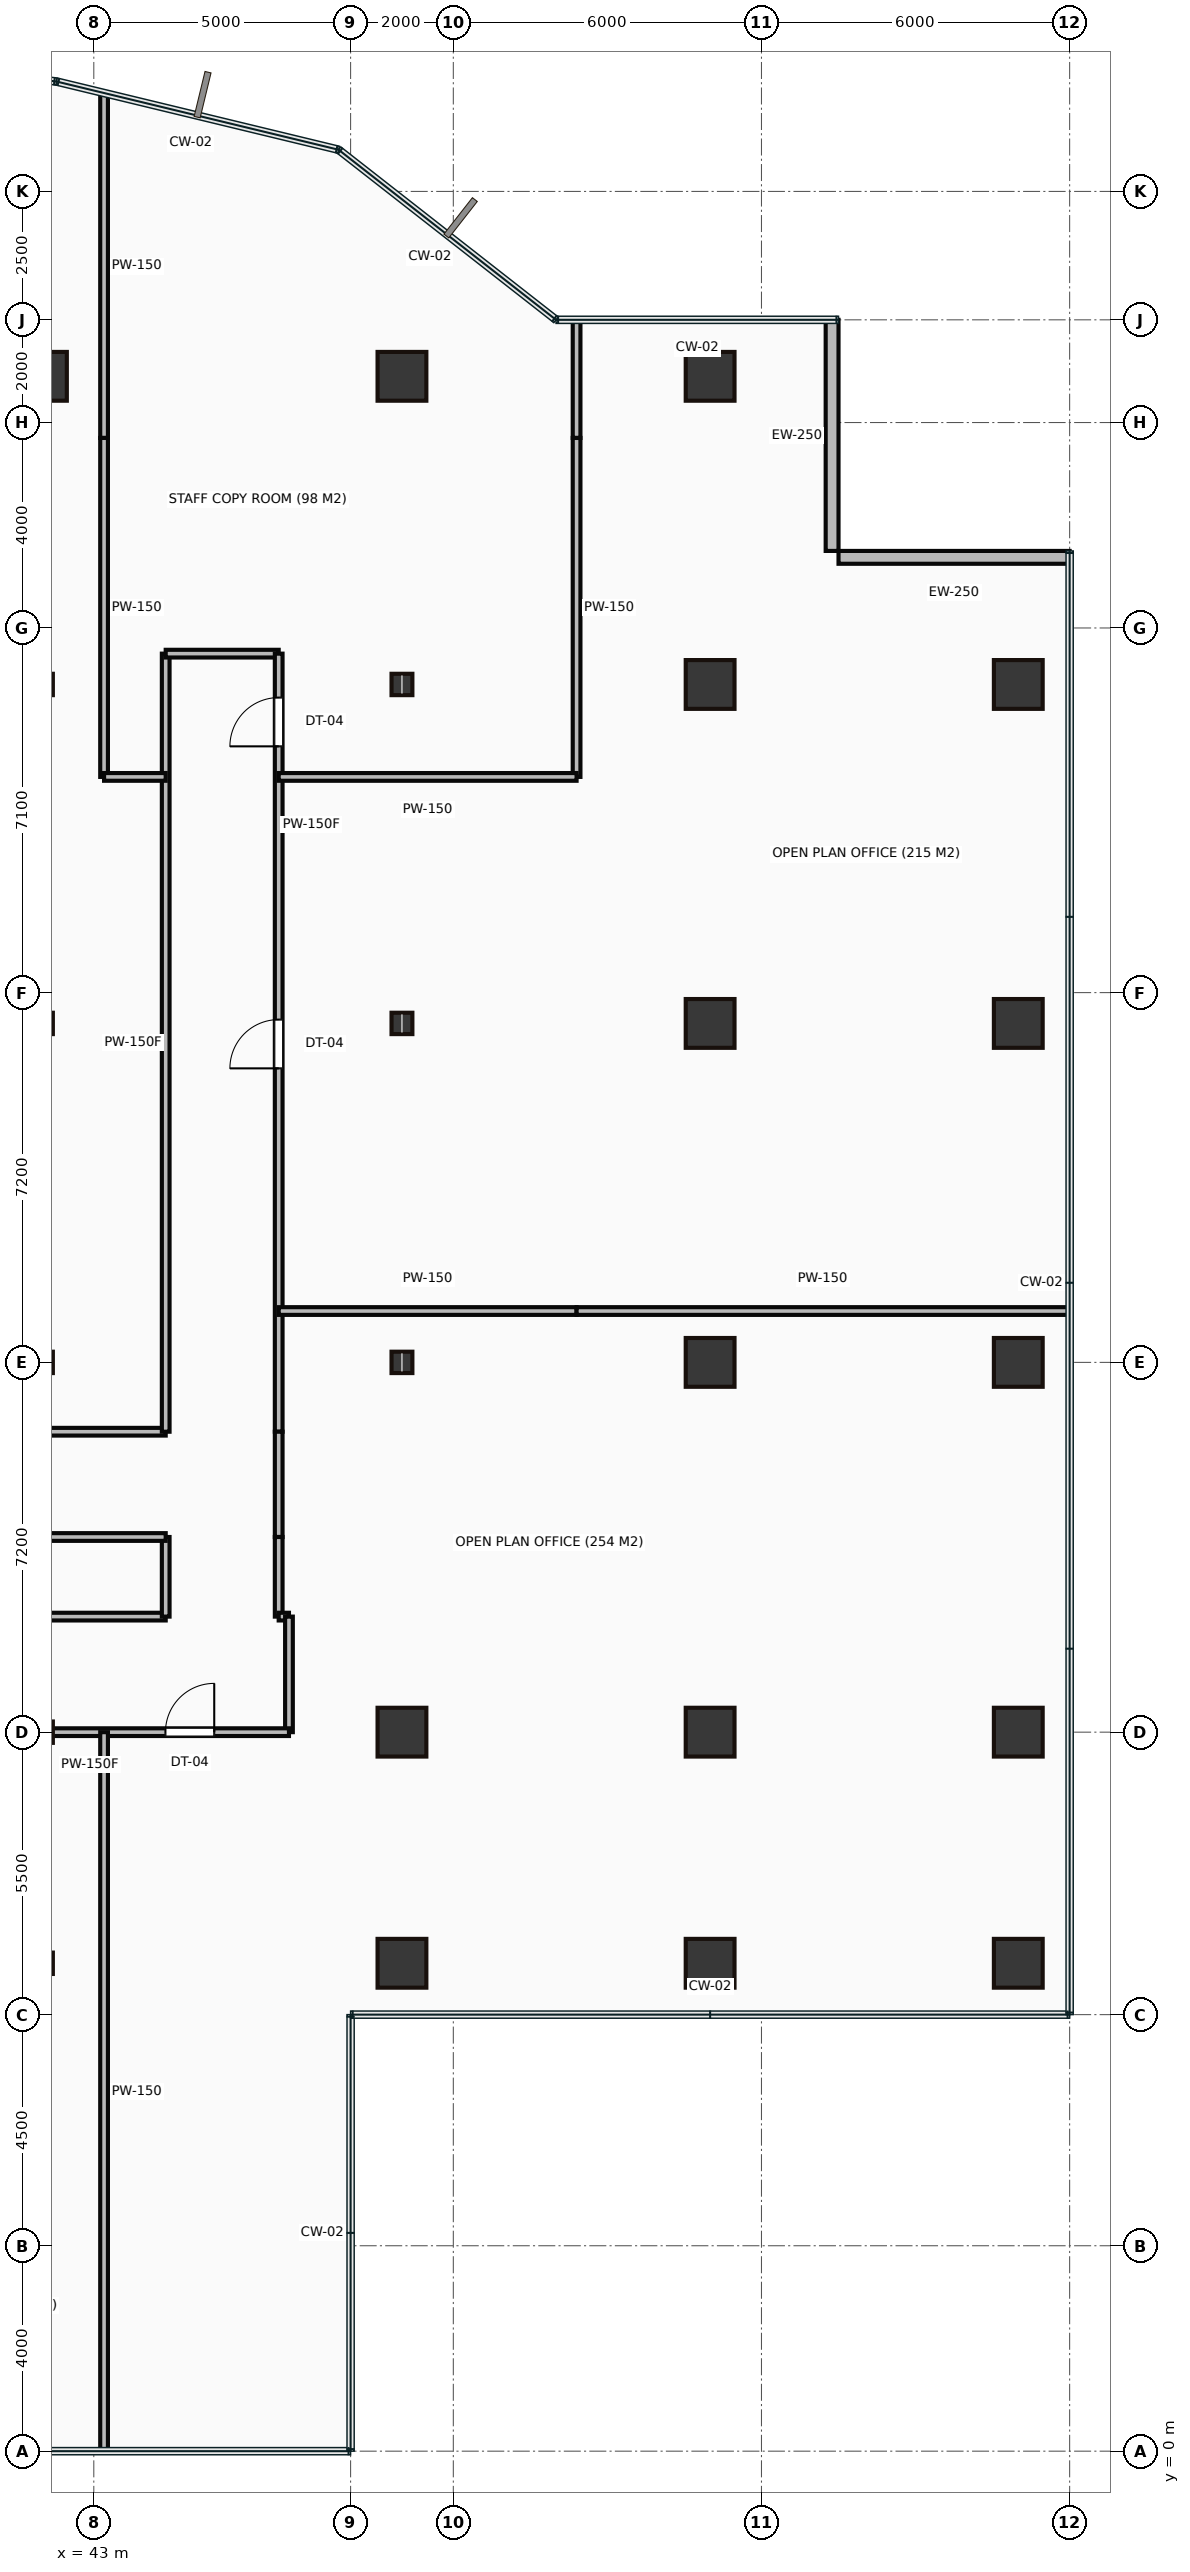
"""IFC4 building model, lengths in metres.
Left out: names, types, materials, properties, quantities, classifications, styles, units other than length and angle.
Written with IfcOpenShell. Run it as: python <this file> out.ifc"""

import sys

from ifc_helpers import new_model, si_unit, direction, frame, frame_2d, origin, origin_2d, place, context, subcontext, project, spatial, rectangle, hollow_rectangle, i_section, extrude, source, transform, mapped, element, fill, save


model = new_model("IFC4")
c1 = context("Model", 3, precision=1e-05, world=origin(), true_north=direction((0.0, 1.0)))
c2 = subcontext(c1, "Body", "Model", "MODEL_VIEW")
j1 = project(units=[si_unit("LENGTHUNIT", "METRE"), si_unit("PLANEANGLEUNIT", "RADIAN")], contexts=[c1])
p1 = place(None, origin())
s1 = spatial("IfcSite", under=j1, at=p1, CompositionType="ELEMENT")
p2 = place(p1, origin())
s2 = spatial("IfcBuilding", under=s1, at=p2, CompositionType="ELEMENT")
p3 = place(p2, frame((0.0, 0.0, 76.3)))
s3 = spatial("IfcBuildingStorey", under=s2, at=p3, CompositionType="ELEMENT", Elevation=76.3)
m1 = source(origin(), c2, "Body", "SweptSolid", [
    extrude(i_section(OverallWidth=0.406, OverallDepth=0.416, WebThickness=0.03, FlangeThickness=0.048, at=origin_2d()), origin(), (0.0, 0.0, 1.0), 3.65),
])
for number, where, z_axis, x_axis in (
    (1, (42.0, 9.5, 0.0), (0.0, 0.0, 1.0), (1.0, 0.0, 0.0)),
    (2, (42.0, 14.0, 0.0), (0.0, 0.0, 1.0), (1.0, 0.0, 0.0)),
    (3, (42.0, 21.2, 0.0), (0.0, 0.0, 1.0), (1.0, 0.0, 0.0)),
    (4, (42.0, 27.8, 0.0), (0.0, 0.0, 1.0), (1.0, 0.0, 0.0)),
    (5, (42.0, 34.4, 0.0), (0.0, 0.0, 1.0), (1.0, 0.0, 0.0)),
):
    element("IfcColumn", number, at=place(p3, frame(where, z_axis=z_axis, x_axis=x_axis)), inside=s3, PredefinedType="COLUMN", context=c2, shape_type="MappedRepresentation", body=[
        mapped(m1, transform((0.0, 0.0, 0.0))),
    ])
m2 = source(origin(), c2, "Body", "SweptSolid", [
    extrude(hollow_rectangle(XDim=0.95, YDim=0.95, WallThickness=0.045, at=origin_2d()), origin(), (0.0, 0.0, 1.0), 3.65),
])
for number, where, z_axis, x_axis in (
    (6, (42.0, 40.4, 0.0), (0.0, 0.0, 1.0), (1.0, 0.0, 0.0)),
    (7, (49.0, 9.5, 0.0), (0.0, 0.0, 1.0), (1.0, 0.0, 0.0)),
    (8, (49.0, 14.0, 0.0), (0.0, 0.0, 1.0), (1.0, 0.0, 0.0)),
):
    element("IfcColumn", number, at=place(p3, frame(where, z_axis=z_axis, x_axis=x_axis)), inside=s3, PredefinedType="COLUMN", context=c2, shape_type="MappedRepresentation", body=[
        mapped(m2, transform((0.0, 0.0, 0.0))),
    ])
for number, where, z_axis, x_axis in (
    (9, (49.0, 21.2, 0.0), (0.0, 0.0, 1.0), (1.0, 0.0, 0.0)),
    (10, (49.0, 27.8, 0.0), (0.0, 0.0, 1.0), (1.0, 0.0, 0.0)),
    (11, (49.0, 34.4, 0.0), (0.0, 0.0, 1.0), (1.0, 0.0, 0.0)),
):
    element("IfcColumn", number, at=place(p3, frame(where, z_axis=z_axis, x_axis=x_axis)), inside=s3, PredefinedType="COLUMN", context=c2, shape_type="MappedRepresentation", body=[
        mapped(m1, transform((0.0, 0.0, 0.0))),
    ])
for number, where, z_axis, x_axis in (
    (12, (49.0, 40.4, 0.0), (0.0, 0.0, 1.0), (1.0, 0.0, 0.0)),
    (13, (55.0, 9.5, 0.0), (0.0, 0.0, 1.0), (1.0, 0.0, 0.0)),
    (14, (55.0, 14.0, 0.0), (0.0, 0.0, 1.0), (1.0, 0.0, 0.0)),
    (15, (55.0, 21.2, 0.0), (0.0, 0.0, 1.0), (1.0, 0.0, 0.0)),
    (16, (55.0, 27.8, 0.0), (0.0, 0.0, 1.0), (1.0, 0.0, 0.0)),
    (17, (55.0, 34.4, 0.0), (0.0, 0.0, 1.0), (1.0, 0.0, 0.0)),
    (18, (55.0, 40.4, 0.0), (0.0, 0.0, 1.0), (1.0, 0.0, 0.0)),
    (19, (61.0, 9.5, 0.0), (0.0, 0.0, 1.0), (1.0, 0.0, 0.0)),
    (20, (61.0, 14.0, 0.0), (0.0, 0.0, 1.0), (1.0, 0.0, 0.0)),
    (21, (61.0, 21.2, 0.0), (0.0, 0.0, 1.0), (1.0, 0.0, 0.0)),
    (22, (61.0, 27.8, 0.0), (0.0, 0.0, 1.0), (1.0, 0.0, 0.0)),
    (23, (61.0, 34.4, 0.0), (0.0, 0.0, 1.0), (1.0, 0.0, 0.0)),
):
    element("IfcColumn", number, at=place(p3, frame(where, z_axis=z_axis, x_axis=x_axis)), inside=s3, PredefinedType="COLUMN", context=c2, shape_type="MappedRepresentation", body=[
        mapped(m2, transform((0.0, 0.0, 0.0))),
    ])
m3 = source(origin(), c2, "Body", "SweptSolid", [
    extrude(rectangle(XDim=4.5, YDim=0.25, at=frame_2d((2.25, 0.0))), origin(), (0.0, 0.0, 1.0), 3.4),
])
for number, where, z_axis, x_axis in (
    (24, (62.0, 36.875, 0.0), (0.0, 0.0, 1.0), (-1.0, 0.0, 0.0)),
    (25, (57.375, 37.0, 0.0), (0.0, 0.0, 1.0), (0.0, 1.0, 0.0)),
):
    element("IfcWall", number, at=place(p3, frame(where, z_axis=z_axis, x_axis=x_axis)), inside=s3, PredefinedType="STANDARD", context=c2, shape_type="MappedRepresentation", body=[
        mapped(m3, transform((0.0, 0.0, 0.0))),
    ])
m4 = source(origin(), c2, "Body", "SweptSolid", [
    extrude(rectangle(XDim=25.4, YDim=0.15, at=frame_2d((12.7, 0.0))), origin(), (0.0, 0.0, 1.0), 3.4),
])
p4 = place(p3, frame((19.0, 19.85, 0.0), z_axis=(0.0, 0.0, 1.0), x_axis=(1.0, 0.0, 0.0)))
e26 = element("IfcWall", 26, at=p4, inside=s3, PredefinedType="PARTITIONING", context=c2, shape_type="MappedRepresentation", body=[
    mapped(m4, transform((0.0, 0.0, 0.0))),
])
p5 = place(p4, frame((12.225, 0.0, 0.0)))
e27 = element("IfcOpeningElement", 27, at=p5, cuts=e26, PredefinedType="OPENING", context=c2, shape_type="SweptSolid", body=[
    extrude(rectangle(XDim=0.95, YDim=2.15, at=frame_2d((0.475, 1.075))), frame((0.0, 0.085, 0.0), z_axis=(0.0, -1.0, 0.0), x_axis=(1.0, 0.0, 0.0)), (0.0, 0.0, 1.0), 0.17),
])
m5 = source(origin(), c2, "Body", "SweptSolid", [
    extrude(rectangle(XDim=15.15, YDim=0.15, at=frame_2d((7.575, 0.0))), origin(), (0.0, 0.0, 1.0), 3.4),
])
p6 = place(p3, frame((44.4, 19.85, 0.0), z_axis=(0.0, 0.0, 1.0), x_axis=(0.0, 1.0, 0.0)))
e28 = element("IfcWall", 28, at=p6, inside=s3, PredefinedType="PARTITIONING", context=c2, shape_type="MappedRepresentation", body=[
    mapped(m5, transform((0.0, 0.0, 0.0))),
])
m6 = source(origin(), c2, "Body", "SweptSolid", [
    extrude(rectangle(XDim=2.2, YDim=0.15, at=frame_2d((1.1, 0.0))), origin(), (0.0, 0.0, 1.0), 3.4),
])
p7 = place(p3, frame((44.4, 35.0, 0.0), z_axis=(0.0, 0.0, 1.0), x_axis=(1.0, 0.0, 0.0)))
e29 = element("IfcWall", 29, at=p7, inside=s3, PredefinedType="PARTITIONING", context=c2, shape_type="MappedRepresentation", body=[
    mapped(m6, transform((0.0, 0.0, 0.0))),
])
p8 = place(p3, frame((46.6, 35.0, 0.0), z_axis=(0.0, 0.0, 1.0), x_axis=(0.0, -1.0, 0.0)))
e30 = element("IfcWall", 30, at=p8, inside=s3, PredefinedType="PARTITIONING", context=c2, shape_type="MappedRepresentation", body=[
    mapped(m5, transform((0.0, 0.0, 0.0))),
])
p9 = place(p8, frame((0.855, 0.0, 0.0)))
e31 = element("IfcOpeningElement", 31, at=p9, cuts=e30, PredefinedType="OPENING", context=c2, shape_type="SweptSolid", body=[
    extrude(rectangle(XDim=0.95, YDim=2.15, at=frame_2d((0.475, 1.075))), frame((0.0, 0.085, 0.0), z_axis=(0.0, -1.0, 0.0), x_axis=(1.0, 0.0, 0.0)), (0.0, 0.0, 1.0), 0.17),
])
p10 = place(p8, frame((7.125, 0.0, 0.0)))
e32 = element("IfcOpeningElement", 32, at=p10, cuts=e30, PredefinedType="OPENING", context=c2, shape_type="SweptSolid", body=[
    extrude(rectangle(XDim=0.95, YDim=2.15, at=frame_2d((0.475, 1.075))), frame((0.0, 0.085, 0.0), z_axis=(0.0, -1.0, 0.0), x_axis=(1.0, 0.0, 0.0)), (0.0, 0.0, 1.0), 0.17),
])
m7 = source(origin(), c2, "Body", "SweptSolid", [
    extrude(rectangle(XDim=2.05, YDim=0.15, at=frame_2d((1.025, 0.0))), origin(), (0.0, 0.0, 1.0), 3.4),
])
p11 = place(p3, frame((46.6, 19.85, 0.0), z_axis=(0.0, 0.0, 1.0), x_axis=(0.0, -1.0, 0.0)))
e33 = element("IfcWall", 33, at=p11, inside=s3, PredefinedType="PARTITIONING", context=c2, shape_type="MappedRepresentation", body=[
    mapped(m7, transform((0.0, 0.0, 0.0))),
])
m8 = source(origin(), c2, "Body", "SweptSolid", [
    extrude(rectangle(XDim=1.55, YDim=0.15, at=frame_2d((0.775, 0.0))), origin(), (0.0, 0.0, 1.0), 3.4),
])
p12 = place(p3, frame((46.6, 17.8, 0.0), z_axis=(0.0, 0.0, 1.0), x_axis=(0.0, -1.0, 0.0)))
e34 = element("IfcWall", 34, at=p12, inside=s3, PredefinedType="PARTITIONING", context=c2, shape_type="MappedRepresentation", body=[
    mapped(m8, transform((0.0, 0.0, 0.0))),
])
m9 = source(origin(), c2, "Body", "SweptSolid", [
    extrude(rectangle(XDim=0.2, YDim=0.15, at=frame_2d((0.1, 0.0))), origin(), (0.0, 0.0, 1.0), 3.4),
])
p13 = place(p3, frame((46.6, 16.25, 0.0), z_axis=(0.0, 0.0, 1.0), x_axis=(1.0, 0.0, 0.0)))
e35 = element("IfcWall", 35, at=p13, inside=s3, PredefinedType="PARTITIONING", context=c2, shape_type="MappedRepresentation", body=[
    mapped(m9, transform((0.0, 0.0, 0.0))),
])
m10 = source(origin(), c2, "Body", "SweptSolid", [
    extrude(rectangle(XDim=2.25, YDim=0.15, at=frame_2d((1.125, 0.0))), origin(), (0.0, 0.0, 1.0), 3.4),
])
p14 = place(p3, frame((46.8, 16.25, 0.0), z_axis=(0.0, 0.0, 1.0), x_axis=(0.0, -1.0, 0.0)))
e36 = element("IfcWall", 36, at=p14, inside=s3, PredefinedType="PARTITIONING", context=c2, shape_type="MappedRepresentation", body=[
    mapped(m10, transform((0.0, 0.0, 0.0))),
])
m11 = source(origin(), c2, "Body", "SweptSolid", [
    extrude(rectangle(XDim=7.75, YDim=0.15, at=frame_2d((3.875, 0.0))), origin(), (0.0, 0.0, 1.0), 2.625),
])
p15 = place(p3, frame((46.8, 14.0, 0.0), z_axis=(0.0, 0.0, 1.0), x_axis=(-1.0, 0.0, 0.0)))
e37 = element("IfcWall", 37, at=p15, inside=s3, PredefinedType="PARTITIONING", context=c2, shape_type="MappedRepresentation", body=[
    mapped(m11, transform((0.0, 0.0, 0.0))),
])
p16 = place(p15, frame((5.96, 0.0, 0.0)))
e38 = element("IfcOpeningElement", 38, at=p16, cuts=e37, PredefinedType="OPENING", context=c2, shape_type="SweptSolid", body=[
    extrude(rectangle(XDim=0.95, YDim=2.15, at=frame_2d((0.475, 1.075))), frame((0.0, 0.085, 0.0), z_axis=(0.0, -1.0, 0.0), x_axis=(1.0, 0.0, 0.0)), (0.0, 0.0, 1.0), 0.17),
])
p17 = place(p15, frame((1.455, 0.0, 0.0)))
e39 = element("IfcOpeningElement", 39, at=p17, cuts=e37, PredefinedType="OPENING", context=c2, shape_type="SweptSolid", body=[
    extrude(rectangle(XDim=0.95, YDim=2.15, at=frame_2d((0.475, 1.075))), frame((0.0, 0.085, 0.0), z_axis=(0.0, -1.0, 0.0), x_axis=(1.0, 0.0, 0.0)), (0.0, 0.0, 1.0), 0.17),
])
p18 = place(p3, frame((19.0, 16.25, 0.0), z_axis=(0.0, 0.0, 1.0), x_axis=(1.0, 0.0, 0.0)))
e40 = element("IfcWall", 40, at=p18, inside=s3, PredefinedType="PARTITIONING", context=c2, shape_type="MappedRepresentation", body=[
    mapped(m4, transform((0.0, 0.0, 0.0))),
])
p19 = place(p18, frame((12.225, 0.0, 0.0)))
e41 = element("IfcOpeningElement", 41, at=p19, cuts=e40, PredefinedType="OPENING", context=c2, shape_type="SweptSolid", body=[
    extrude(rectangle(XDim=0.95, YDim=2.15, at=frame_2d((0.475, 1.075))), frame((0.0, 0.085, 0.0), z_axis=(0.0, -1.0, 0.0), x_axis=(1.0, 0.0, 0.0)), (0.0, 0.0, 1.0), 0.17),
])
p20 = place(p3, frame((44.4, 16.25, 0.0), z_axis=(0.0, 0.0, 1.0), x_axis=(0.0, 1.0, 0.0)))
e42 = element("IfcWall", 42, at=p20, inside=s3, PredefinedType="PARTITIONING", context=c2, shape_type="MappedRepresentation", body=[
    mapped(m8, transform((0.0, 0.0, 0.0))),
])
p21 = place(p3, frame((44.4, 17.8, 0.0), z_axis=(0.0, 0.0, 1.0), x_axis=(-1.0, 0.0, 0.0)))
e43 = element("IfcWall", 43, at=p21, inside=s3, PredefinedType="PARTITIONING", context=c2, shape_type="MappedRepresentation", body=[
    mapped(m4, transform((0.0, 0.0, 0.0))),
])
m12 = source(origin(), c2, "Body", "SweptSolid", [
    extrude(rectangle(XDim=13.98, YDim=0.15, at=frame_2d((6.99, 0.0))), origin(), (0.0, 0.0, 1.0), 3.4),
])
p22 = place(p3, frame((43.2, 14.0, 0.0), z_axis=(0.0, 0.0, 1.0), x_axis=(0.0, -1.0, 0.0)))
e44 = element("IfcWall", 44, at=p22, inside=s3, PredefinedType="PARTITIONING", context=c2, shape_type="MappedRepresentation", body=[
    mapped(m12, transform((0.0, 0.0, 0.0))),
])
m13 = source(origin(), c2, "Body", "SweptSolid", [
    extrude(rectangle(XDim=6.696, YDim=0.15, at=frame_2d((3.348, 0.0))), origin(), (0.0, 0.0, 1.0), 3.4),
])
p23 = place(p3, frame((43.2, 45.896, 0.0), z_axis=(0.0, 0.0, 1.0), x_axis=(0.0, -1.0, 0.0)))
e45 = element("IfcWall", 45, at=p23, inside=s3, PredefinedType="PARTITIONING", context=c2, shape_type="MappedRepresentation", body=[
    mapped(m13, transform((0.0, 0.0, 0.0))),
])
m14 = source(origin(), c2, "Body", "SweptSolid", [
    extrude(rectangle(XDim=6.6, YDim=0.15, at=frame_2d((3.3, 0.0))), origin(), (0.0, 0.0, 1.0), 3.4),
])
p24 = place(p3, frame((43.2, 39.2, 0.0), z_axis=(0.0, 0.0, 1.0), x_axis=(0.0, -1.0, 0.0)))
e46 = element("IfcWall", 46, at=p24, inside=s3, PredefinedType="PARTITIONING", context=c2, shape_type="MappedRepresentation", body=[
    mapped(m14, transform((0.0, 0.0, 0.0))),
])
m15 = source(origin(), c2, "Body", "SweptSolid", [
    extrude(rectangle(XDim=1.2, YDim=0.15, at=frame_2d((0.6, 0.0))), origin(), (0.0, 0.0, 1.0), 3.4),
])
p25 = place(p3, frame((43.2, 32.6, 0.0), z_axis=(0.0, 0.0, 1.0), x_axis=(1.0, 0.0, 0.0)))
e47 = element("IfcWall", 47, at=p25, inside=s3, PredefinedType="PARTITIONING", context=c2, shape_type="MappedRepresentation", body=[
    mapped(m15, transform((0.0, 0.0, 0.0))),
])
m16 = source(origin(), c2, "Body", "SweptSolid", [
    extrude(rectangle(XDim=5.8, YDim=0.15, at=frame_2d((2.9, 0.0))), origin(), (0.0, 0.0, 1.0), 3.4),
])
p26 = place(p3, frame((46.6, 22.2, 0.0), z_axis=(0.0, 0.0, 1.0), x_axis=(1.0, 0.0, 0.0)))
e48 = element("IfcWall", 48, at=p26, inside=s3, PredefinedType="PARTITIONING", context=c2, shape_type="MappedRepresentation", body=[
    mapped(m16, transform((0.0, 0.0, 0.0))),
])
m17 = source(origin(), c2, "Body", "SweptSolid", [
    extrude(rectangle(XDim=9.58, YDim=0.15, at=frame_2d((4.79, 0.0))), origin(), (0.0, 0.0, 1.0), 3.4),
])
p27 = place(p3, frame((52.4, 22.2, 0.0), z_axis=(0.0, 0.0, 1.0), x_axis=(1.0, 0.0, 0.0)))
e49 = element("IfcWall", 49, at=p27, inside=s3, PredefinedType="PARTITIONING", context=c2, shape_type="MappedRepresentation", body=[
    mapped(m17, transform((0.0, 0.0, 0.0))),
])
m18 = source(origin(), c2, "Body", "SweptSolid", [
    extrude(rectangle(XDim=2.28, YDim=0.15, at=frame_2d((1.14, 0.0))), origin(), (0.0, 0.0, 1.0), 3.4),
])
p28 = place(p3, frame((52.4, 41.48, 0.0), z_axis=(0.0, 0.0, 1.0), x_axis=(0.0, -1.0, 0.0)))
e50 = element("IfcWall", 50, at=p28, inside=s3, PredefinedType="PARTITIONING", context=c2, shape_type="MappedRepresentation", body=[
    mapped(m18, transform((0.0, 0.0, 0.0))),
])
p29 = place(p3, frame((52.4, 39.2, 0.0), z_axis=(0.0, 0.0, 1.0), x_axis=(0.0, -1.0, 0.0)))
e51 = element("IfcWall", 51, at=p29, inside=s3, PredefinedType="PARTITIONING", context=c2, shape_type="MappedRepresentation", body=[
    mapped(m14, transform((0.0, 0.0, 0.0))),
])
p30 = place(p3, frame((52.4, 32.6, 0.0), z_axis=(0.0, 0.0, 1.0), x_axis=(-1.0, 0.0, 0.0)))
e52 = element("IfcWall", 52, at=p30, inside=s3, PredefinedType="PARTITIONING", context=c2, shape_type="MappedRepresentation", body=[
    mapped(m16, transform((0.0, 0.0, 0.0))),
])
m19 = source(origin(), c2, "Body", "SweptSolid", [
    extrude(rectangle(XDim=0.95, YDim=2.15, at=frame_2d((0.475, 1.075))), frame((0.0, 0.025, 0.0), z_axis=(0.0, -1.0, 0.0), x_axis=(1.0, 0.0, 0.0)), (0.0, 0.0, 1.0), 0.05),
])
p31 = place(p9, origin())
e53 = element("IfcDoor", 53, at=p31, inside=s3, OperationType="SINGLE_SWING_RIGHT", PredefinedType="DOOR", context=c2, shape_type="MappedRepresentation", body=[
    mapped(m19, transform((0.0, 0.0, 0.0))),
])
fill(e31, e53)
p32 = place(p17, origin())
e54 = element("IfcDoor", 54, at=p32, inside=s3, OperationType="SINGLE_SWING_LEFT", PredefinedType="DOOR", context=c2, shape_type="MappedRepresentation", body=[
    mapped(m19, transform((0.0, 0.0, 0.0))),
])
fill(e39, e54)
p33 = place(p10, origin())
e55 = element("IfcDoor", 55, at=p33, inside=s3, OperationType="SINGLE_SWING_RIGHT", PredefinedType="DOOR", context=c2, shape_type="MappedRepresentation", body=[
    mapped(m19, transform((0.0, 0.0, 0.0))),
])
fill(e32, e55)
save(model, sys.argv[1])
